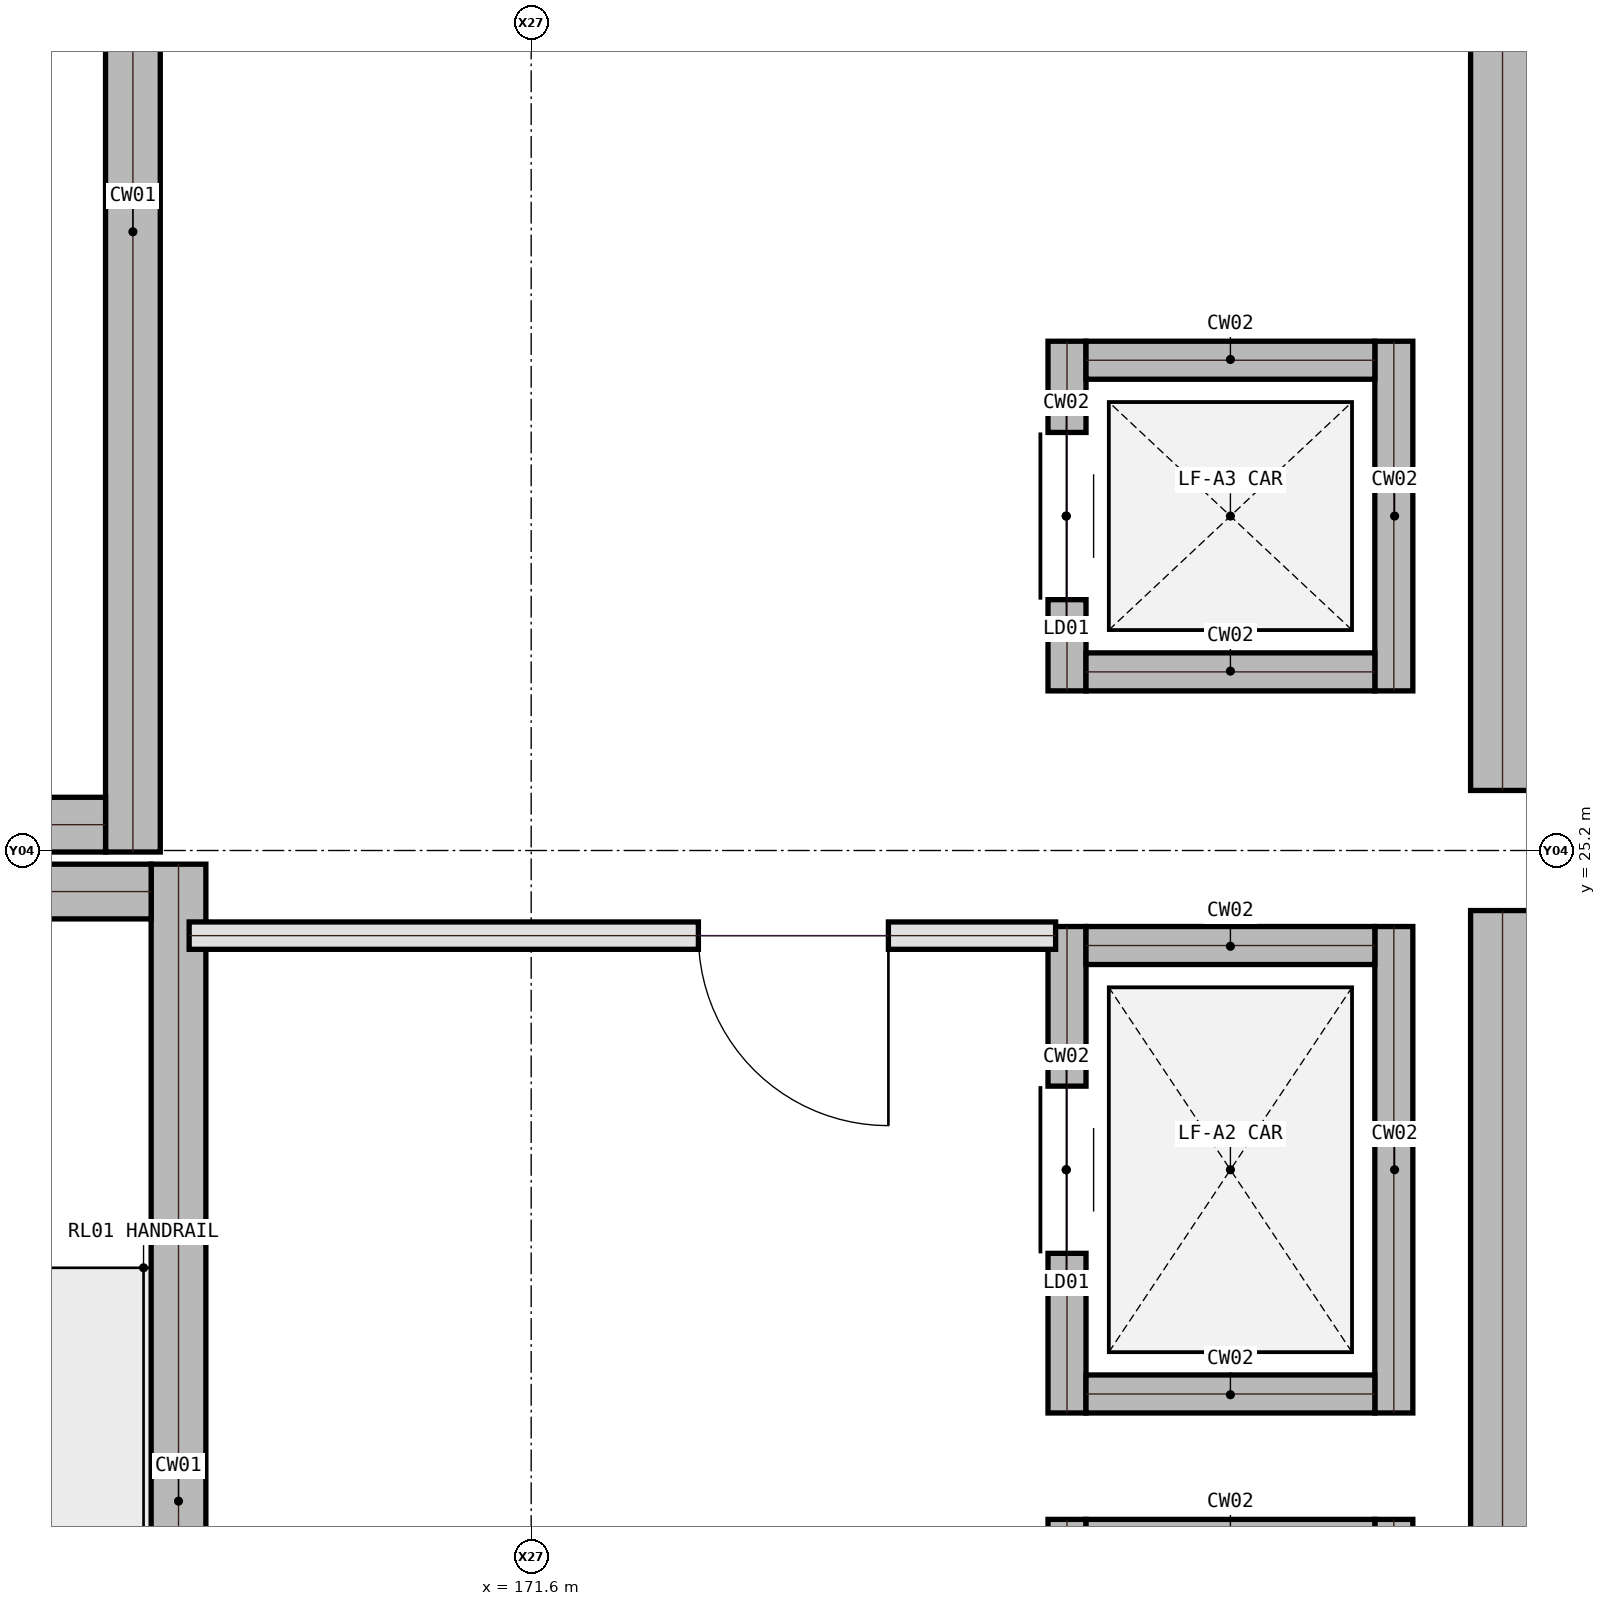
"""IFC4 building model, lengths in metres.
Left out: names, types, materials, properties, quantities, classifications, styles, units other than length and angle.
Written with IfcOpenShell. Run it as: python <this file> out.ifc"""

import sys

from ifc_helpers import new_model, si_unit, direction, frame, frame_2d, origin, origin_2d, place, context, subcontext, project, spatial, rectangle, extrude, element, fill, save


model = new_model("IFC4")
c1 = context("Model", 3, precision=1e-05, world=origin(), true_north=direction((0.0, 1.0)))
c2 = subcontext(c1, "Body", "Model", "MODEL_VIEW")
j1 = project(units=[si_unit("LENGTHUNIT", "METRE"), si_unit("PLANEANGLEUNIT", "RADIAN")], contexts=[c1])
p1 = place(None, origin())
s1 = spatial("IfcSite", under=j1, at=p1, CompositionType="ELEMENT")
p2 = place(p1, origin())
s2 = spatial("IfcBuilding", under=s1, at=p2, CompositionType="ELEMENT")
p3 = place(p2, frame((0.0, 0.0, -4.5)))
s3 = spatial("IfcBuildingStorey", under=s2, at=p3, CompositionType="ELEMENT", Elevation=-4.5)
p4 = place(p3, frame((171.6, 25.2, 0.0), z_axis=(0.0, 0.0, 1.0), x_axis=(1.0, 0.0, 0.0)))
e1 = element("IfcColumn", 1, at=p4, inside=s3, PredefinedType="COLUMN", context=c2, shape_type="SweptSolid", body=[
    extrude(rectangle(XDim=0.9, YDim=0.9, at=origin_2d()), origin(), (0.0, 0.0, 1.0), 4.5),
])
p5 = place(p3, frame((178.2, 25.2, 0.0), z_axis=(0.0, 0.0, 1.0), x_axis=(1.0, 0.0, 0.0)))
e2 = element("IfcColumn", 2, at=p5, inside=s3, PredefinedType="COLUMN", context=c2, shape_type="SweptSolid", body=[
    extrude(rectangle(XDim=0.8, YDim=0.8, at=origin_2d()), origin(), (0.0, 0.0, 1.0), 4.5),
])
p6 = place(p3, frame((177.99, 17.195, 0.0), z_axis=(0.0, 0.0, 1.0), x_axis=(0.0, 1.0, 0.0)))
e3 = element("IfcWall", 3, at=p6, inside=s3, PredefinedType="SOLIDWALL", context=c2, shape_type="SweptSolid", body=[
    extrude(rectangle(XDim=7.61, YDim=0.42, at=frame_2d((3.805, 0.0))), origin(), (0.0, 0.0, 1.0), 4.14),
])
p7 = place(p3, frame((177.99, 25.595, 0.0), z_axis=(0.0, 0.0, 1.0), x_axis=(0.0, 1.0, 0.0)))
e4 = element("IfcWall", 4, at=p7, inside=s3, PredefinedType="SOLIDWALL", context=c2, shape_type="SweptSolid", body=[
    extrude(rectangle(XDim=7.61, YDim=0.42, at=frame_2d((3.805, 0.0))), origin(), (0.0, 0.0, 1.0), 4.14),
])
p8 = place(p3, frame((169.28, 16.74, 0.0), z_axis=(0.0, 0.0, 1.0), x_axis=(0.0, 1.0, 0.0)))
e5 = element("IfcWall", 5, at=p8, inside=s3, PredefinedType="SHEAR", context=c2, shape_type="SweptSolid", body=[
    extrude(rectangle(XDim=8.37, YDim=0.36, at=frame_2d((4.185, 0.0))), origin(), (0.0, 0.0, 1.0), 4.14),
])
p9 = place(p8, frame((0.45, 0.0, 0.0)))
e6 = element("IfcOpeningElement", 6, at=p9, cuts=e5, PredefinedType="OPENING", context=c2, shape_type="SweptSolid", body=[
    extrude(rectangle(XDim=1.25, YDim=2.15, at=frame_2d((0.625, 1.075))), frame((0.0, 0.19, 0.0), z_axis=(0.0, -1.0, 0.0), x_axis=(1.0, 0.0, 0.0)), (0.0, 0.0, 1.0), 0.38),
])
p10 = place(p3, frame((165.6, 24.93, 0.0), z_axis=(0.0, 0.0, 1.0), x_axis=(1.0, 0.0, 0.0)))
e7 = element("IfcWall", 7, at=p10, inside=s3, PredefinedType="SHEAR", context=c2, shape_type="SweptSolid", body=[
    extrude(rectangle(XDim=3.5, YDim=0.36, at=frame_2d((1.75, 0.0))), origin(), (0.0, 0.0, 1.0), 4.14),
])
p11 = place(p3, frame((168.98, 25.19, 0.0), z_axis=(0.0, 0.0, 1.0), x_axis=(0.0, 1.0, 0.0)))
e8 = element("IfcWall", 8, at=p11, inside=s3, PredefinedType="SHEAR", context=c2, shape_type="SweptSolid", body=[
    extrude(rectangle(XDim=8.17, YDim=0.36, at=frame_2d((4.085, 0.0))), origin(), (0.0, 0.0, 1.0), 4.14),
])
p12 = place(p3, frame((165.6, 25.37, 0.0), z_axis=(0.0, 0.0, 1.0), x_axis=(1.0, 0.0, 0.0)))
e9 = element("IfcWall", 9, at=p12, inside=s3, PredefinedType="SHEAR", context=c2, shape_type="SweptSolid", body=[
    extrude(rectangle(XDim=3.2, YDim=0.36, at=frame_2d((1.6, 0.0))), origin(), (0.0, 0.0, 1.0), 4.14),
])
p13 = place(p3, frame((175.125, 17.6, 0.0), z_axis=(0.0, 0.0, 1.0), x_axis=(0.0, 1.0, 0.0)))
e10 = element("IfcWall", 10, at=p13, inside=s3, PredefinedType="SHEAR", context=c2, shape_type="SweptSolid", body=[
    extrude(rectangle(XDim=3.2, YDim=0.25, at=frame_2d((1.6, 0.0))), origin(), (0.0, 0.0, 1.0), 4.14),
])
p14 = place(p13, frame((1.05, 0.0, 0.0)))
e11 = element("IfcOpeningElement", 11, at=p14, cuts=e10, PredefinedType="OPENING", context=c2, shape_type="SweptSolid", body=[
    extrude(rectangle(XDim=1.1, YDim=2.15, at=frame_2d((0.55, 1.075))), frame((0.0, 0.135, 0.0), z_axis=(0.0, -1.0, 0.0), x_axis=(1.0, 0.0, 0.0)), (0.0, 0.0, 1.0), 0.27),
])
p15 = place(p3, frame((177.275, 17.6, 0.0), z_axis=(0.0, 0.0, 1.0), x_axis=(0.0, 1.0, 0.0)))
e12 = element("IfcWall", 12, at=p15, inside=s3, PredefinedType="SHEAR", context=c2, shape_type="SweptSolid", body=[
    extrude(rectangle(XDim=3.2, YDim=0.25, at=frame_2d((1.6, 0.0))), origin(), (0.0, 0.0, 1.0), 4.14),
])
p16 = place(p3, frame((175.25, 20.675, 0.0), z_axis=(0.0, 0.0, 1.0), x_axis=(1.0, 0.0, 0.0)))
e13 = element("IfcWall", 13, at=p16, inside=s3, PredefinedType="SHEAR", context=c2, shape_type="SweptSolid", body=[
    extrude(rectangle(XDim=1.9, YDim=0.25, at=frame_2d((0.95, 0.0))), origin(), (0.0, 0.0, 1.0), 4.14),
])
p17 = place(p3, frame((175.125, 21.5, 0.0), z_axis=(0.0, 0.0, 1.0), x_axis=(0.0, 1.0, 0.0)))
e14 = element("IfcWall", 14, at=p17, inside=s3, PredefinedType="SHEAR", context=c2, shape_type="SweptSolid", body=[
    extrude(rectangle(XDim=3.2, YDim=0.25, at=frame_2d((1.6, 0.0))), origin(), (0.0, 0.0, 1.0), 4.14),
])
p18 = place(p17, frame((1.05, 0.0, 0.0)))
e15 = element("IfcOpeningElement", 15, at=p18, cuts=e14, PredefinedType="OPENING", context=c2, shape_type="SweptSolid", body=[
    extrude(rectangle(XDim=1.1, YDim=2.15, at=frame_2d((0.55, 1.075))), frame((0.0, 0.135, 0.0), z_axis=(0.0, -1.0, 0.0), x_axis=(1.0, 0.0, 0.0)), (0.0, 0.0, 1.0), 0.27),
])
p19 = place(p3, frame((177.275, 21.5, 0.0), z_axis=(0.0, 0.0, 1.0), x_axis=(0.0, 1.0, 0.0)))
e16 = element("IfcWall", 16, at=p19, inside=s3, PredefinedType="SHEAR", context=c2, shape_type="SweptSolid", body=[
    extrude(rectangle(XDim=3.2, YDim=0.25, at=frame_2d((1.6, 0.0))), origin(), (0.0, 0.0, 1.0), 4.14),
])
for number, where, z_axis, x_axis in (
    (17, (175.25, 21.625, 0.0), (0.0, 0.0, 1.0), (1.0, 0.0, 0.0)),
    (18, (175.25, 24.575, 0.0), (0.0, 0.0, 1.0), (1.0, 0.0, 0.0)),
):
    element("IfcWall", number, at=place(p3, frame(where, z_axis=z_axis, x_axis=x_axis)), inside=s3, PredefinedType="SHEAR", context=c2, shape_type="SweptSolid", body=[
        extrude(rectangle(XDim=1.9, YDim=0.25, at=frame_2d((0.95, 0.0))), origin(), (0.0, 0.0, 1.0), 4.14),
    ])
p20 = place(p3, frame((175.125, 26.25, 0.0), z_axis=(0.0, 0.0, 1.0), x_axis=(0.0, 1.0, 0.0)))
e19 = element("IfcWall", 19, at=p20, inside=s3, PredefinedType="SHEAR", context=c2, shape_type="SweptSolid", body=[
    extrude(rectangle(XDim=2.3, YDim=0.25, at=frame_2d((1.15, 0.0))), origin(), (0.0, 0.0, 1.0), 4.14),
])
p21 = place(p20, frame((0.6, 0.0, 0.0)))
e20 = element("IfcOpeningElement", 20, at=p21, cuts=e19, PredefinedType="OPENING", context=c2, shape_type="SweptSolid", body=[
    extrude(rectangle(XDim=1.1, YDim=2.15, at=frame_2d((0.55, 1.075))), frame((0.0, 0.135, 0.0), z_axis=(0.0, -1.0, 0.0), x_axis=(1.0, 0.0, 0.0)), (0.0, 0.0, 1.0), 0.27),
])
p22 = place(p3, frame((177.275, 26.25, 0.0), z_axis=(0.0, 0.0, 1.0), x_axis=(0.0, 1.0, 0.0)))
e21 = element("IfcWall", 21, at=p22, inside=s3, PredefinedType="SHEAR", context=c2, shape_type="SweptSolid", body=[
    extrude(rectangle(XDim=2.3, YDim=0.25, at=frame_2d((1.15, 0.0))), origin(), (0.0, 0.0, 1.0), 4.14),
])
for number, where, z_axis, x_axis in (
    (22, (175.25, 26.375, 0.0), (0.0, 0.0, 1.0), (1.0, 0.0, 0.0)),
    (23, (175.25, 28.425, 0.0), (0.0, 0.0, 1.0), (1.0, 0.0, 0.0)),
):
    element("IfcWall", number, at=place(p3, frame(where, z_axis=z_axis, x_axis=x_axis)), inside=s3, PredefinedType="SHEAR", context=c2, shape_type="SweptSolid", body=[
        extrude(rectangle(XDim=1.9, YDim=0.25, at=frame_2d((0.95, 0.0))), origin(), (0.0, 0.0, 1.0), 4.14),
    ])
p23 = place(p3, frame((169.35, 24.64, 0.0), z_axis=(0.0, 0.0, 1.0), x_axis=(1.0, 0.0, 0.0)))
e24 = element("IfcWall", 24, at=p23, inside=s3, PredefinedType="SOLIDWALL", context=c2, shape_type="SweptSolid", body=[
    extrude(rectangle(XDim=5.7, YDim=0.18, at=frame_2d((2.85, 0.0))), origin(), (0.0, 0.0, 1.0), 4.14),
])
p24 = place(p23, frame((3.35, 0.0, 0.0)))
e25 = element("IfcOpeningElement", 25, at=p24, cuts=e24, PredefinedType="OPENING", context=c2, shape_type="SweptSolid", body=[
    extrude(rectangle(XDim=1.25, YDim=2.15, at=frame_2d((0.625, 1.075))), frame((0.0, 0.1, 0.0), z_axis=(0.0, -1.0, 0.0), x_axis=(1.0, 0.0, 0.0)), (0.0, 0.0, 1.0), 0.2),
])
p25 = place(p18, origin())
e26 = element("IfcDoor", 26, at=p25, inside=s3, OperationType="SLIDING_TO_LEFT", PredefinedType="DOOR", context=c2, shape_type="SweptSolid", body=[
    extrude(rectangle(XDim=1.1, YDim=2.15, at=frame_2d((0.55, 1.075))), frame((0.0, 0.025, 0.0), z_axis=(0.0, -1.0, 0.0), x_axis=(1.0, 0.0, 0.0)), (0.0, 0.0, 1.0), 0.05),
])
fill(e15, e26)
p26 = place(p21, origin())
e27 = element("IfcDoor", 27, at=p26, inside=s3, OperationType="SLIDING_TO_LEFT", PredefinedType="DOOR", context=c2, shape_type="SweptSolid", body=[
    extrude(rectangle(XDim=1.1, YDim=2.15, at=frame_2d((0.55, 1.075))), frame((0.0, 0.025, 0.0), z_axis=(0.0, -1.0, 0.0), x_axis=(1.0, 0.0, 0.0)), (0.0, 0.0, 1.0), 0.05),
])
fill(e20, e27)
p27 = place(p24, frame((1.25, 0.0, 0.0), z_axis=(0.0, 0.0, 1.0), x_axis=(-1.0, 0.0, 0.0)))
e28 = element("IfcDoor", 28, at=p27, inside=s3, OperationType="SINGLE_SWING_RIGHT", PredefinedType="DOOR", context=c2, shape_type="SweptSolid", body=[
    extrude(rectangle(XDim=1.25, YDim=2.15, at=frame_2d((0.625, 1.075))), frame((0.0, 0.025, 0.0), z_axis=(0.0, -1.0, 0.0), x_axis=(1.0, 0.0, 0.0)), (0.0, 0.0, 1.0), 0.05),
])
fill(e25, e28)
save(model, sys.argv[1])
